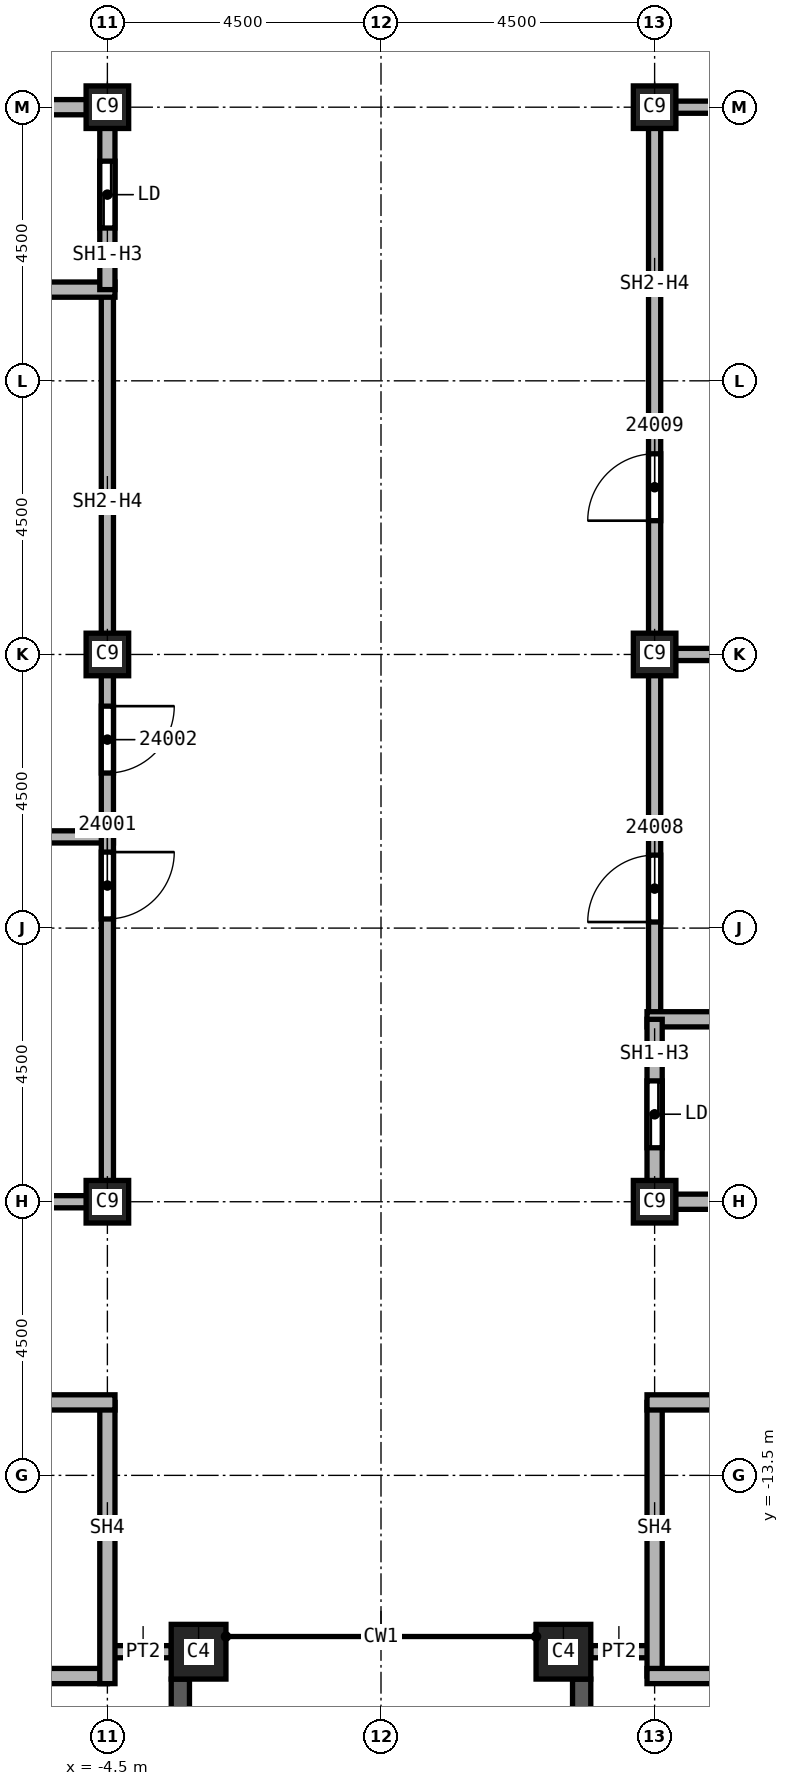
"""IFC4 building model, lengths in metres.
Left out: names, types, materials, properties, quantities, classifications, styles, units other than length and angle.
Written with IfcOpenShell. Run it as: python <this file> out.ifc"""

import sys

from ifc_helpers import new_model, si_unit, direction, frame, frame_2d, origin, origin_2d, place, context, subcontext, project, spatial, rectangle, extrude, element, fill, save


model = new_model("IFC4")
c1 = context("Model", 3, precision=1e-05, world=origin(), true_north=direction((0.0, 1.0)))
c2 = subcontext(c1, "Body", "Model", "MODEL_VIEW")
j1 = project(units=[si_unit("LENGTHUNIT", "METRE"), si_unit("PLANEANGLEUNIT", "RADIAN")], contexts=[c1])
p1 = place(None, origin())
s1 = spatial("IfcSite", under=j1, at=p1, CompositionType="ELEMENT")
p2 = place(p1, origin())
s2 = spatial("IfcBuilding", under=s1, at=p2, CompositionType="ELEMENT")
p3 = place(p2, frame((0.0, 0.0, 342.0)))
s3 = spatial("IfcBuildingStorey", under=s2, at=p3, CompositionType="ELEMENT", Elevation=342.0)
for number, where, z_axis, x_axis in (
    (1, (4.5, 0.0, 0.0), (0.0, 0.0, 1.0), (1.0, 0.0, 0.0)),
    (2, (4.5, 9.0, 0.0), (0.0, 0.0, 1.0), (1.0, 0.0, 0.0)),
    (3, (4.5, -9.0, 0.0), (0.0, 0.0, 1.0), (1.0, 0.0, 0.0)),
    (4, (-4.5, 0.0, 0.0), (0.0, 0.0, 1.0), (1.0, 0.0, 0.0)),
    (5, (-4.5, 9.0, 0.0), (0.0, 0.0, 1.0), (1.0, 0.0, 0.0)),
    (6, (-4.5, -9.0, 0.0), (0.0, 0.0, 1.0), (1.0, 0.0, 0.0)),
):
    element("IfcColumn", number, at=place(p3, frame(where, z_axis=z_axis, x_axis=x_axis)), inside=s3, PredefinedType="COLUMN", context=c2, shape_type="SweptSolid", body=[
        extrude(rectangle(XDim=0.7, YDim=0.7, at=origin_2d()), origin(), (0.0, 0.0, 1.0), 3.74),
    ])
for number, where, z_axis, x_axis in (
    (7, (3.0, -16.4, 0.0), (0.0, 0.0, 1.0), (1.0, 0.0, 0.0)),
    (8, (-3.0, -16.4, 0.0), (0.0, 0.0, 1.0), (1.0, 0.0, 0.0)),
):
    element("IfcColumn", number, at=place(p3, frame(where, z_axis=z_axis, x_axis=x_axis)), inside=s3, PredefinedType="COLUMN", context=c2, shape_type="SweptSolid", body=[
        extrude(rectangle(XDim=0.9, YDim=0.9, at=origin_2d()), origin(), (0.0, 0.0, 1.0), 3.74),
    ])
p4 = place(p3, frame((-3.3, -24.95, 0.0), z_axis=(0.0, 0.0, 1.0), x_axis=(0.0, 1.0, 0.0)))
e9 = element("IfcWall", 9, at=p4, inside=s3, PredefinedType="SOLIDWALL", context=c2, shape_type="SweptSolid", body=[
    extrude(rectangle(XDim=8.1, YDim=0.3, at=frame_2d((4.05, 0.0))), origin(), (0.0, 0.0, 1.0), 3.14),
])
p5 = place(p4, frame((0.825, 0.0, 0.8)))
e10 = element("IfcOpeningElement", 10, at=p5, cuts=e9, PredefinedType="OPENING", context=c2, shape_type="SweptSolid", body=[
    extrude(rectangle(XDim=2.4, YDim=1.95, at=frame_2d((1.2, 0.975))), frame((0.0, 0.15, 0.0), z_axis=(0.0, -1.0, 0.0), x_axis=(1.0, 0.0, 0.0)), (0.0, 0.0, 1.0), 0.3),
])
p6 = place(p4, frame((4.875, 0.0, 0.8)))
e11 = element("IfcOpeningElement", 11, at=p6, cuts=e9, PredefinedType="OPENING", context=c2, shape_type="SweptSolid", body=[
    extrude(rectangle(XDim=2.4, YDim=1.95, at=frame_2d((1.2, 0.975))), frame((0.0, 0.15, 0.0), z_axis=(0.0, -1.0, 0.0), x_axis=(1.0, 0.0, 0.0)), (0.0, 0.0, 1.0), 0.3),
])
p7 = place(p3, frame((3.3, -16.85, 0.0), z_axis=(0.0, 0.0, 1.0), x_axis=(0.0, -1.0, 0.0)))
e12 = element("IfcWall", 12, at=p7, inside=s3, PredefinedType="SOLIDWALL", context=c2, shape_type="SweptSolid", body=[
    extrude(rectangle(XDim=8.1, YDim=0.3, at=frame_2d((4.05, 0.0))), origin(), (0.0, 0.0, 1.0), 3.14),
])
p8 = place(p7, frame((0.825, 0.0, 0.8)))
e13 = element("IfcOpeningElement", 13, at=p8, cuts=e12, PredefinedType="OPENING", context=c2, shape_type="SweptSolid", body=[
    extrude(rectangle(XDim=2.4, YDim=1.95, at=frame_2d((1.2, 0.975))), frame((0.0, 0.15, 0.0), z_axis=(0.0, -1.0, 0.0), x_axis=(1.0, 0.0, 0.0)), (0.0, 0.0, 1.0), 0.3),
])
p9 = place(p7, frame((4.875, 0.0, 0.8)))
e14 = element("IfcOpeningElement", 14, at=p9, cuts=e12, PredefinedType="OPENING", context=c2, shape_type="SweptSolid", body=[
    extrude(rectangle(XDim=2.4, YDim=1.95, at=frame_2d((1.2, 0.975))), frame((0.0, 0.15, 0.0), z_axis=(0.0, -1.0, 0.0), x_axis=(1.0, 0.0, 0.0)), (0.0, 0.0, 1.0), 0.3),
])
for number, where, z_axis, x_axis in (
    (15, (-3.45, -16.4, 0.0), (0.0, 0.0, 1.0), (-1.0, 0.0, 0.0)),
    (16, (4.5, -16.4, 0.0), (0.0, 0.0, 1.0), (-1.0, 0.0, 0.0)),
):
    element("IfcWall", number, at=place(p3, frame(where, z_axis=z_axis, x_axis=x_axis)), inside=s3, PredefinedType="PARTITIONING", context=c2, shape_type="SweptSolid", body=[
        extrude(rectangle(XDim=1.05, YDim=0.2, at=frame_2d((0.525, 0.0))), origin(), (0.0, 0.0, 1.0), 3.74),
    ])
p10 = place(p3, frame((-7.625, -3.0, 0.0), z_axis=(0.0, 0.0, 1.0), x_axis=(1.0, 0.0, 0.0)))
e17 = element("IfcWall", 17, at=p10, inside=s3, PredefinedType="SOLIDWALL", context=c2, shape_type="SweptSolid", body=[
    extrude(rectangle(XDim=3.225, YDim=0.2, at=frame_2d((1.613, 0.0))), origin(), (0.0, 0.0, 1.0), 3.74),
])
p11 = place(p3, frame((-4.5, -9.0, 0.0), z_axis=(0.0, 0.0, 1.0), x_axis=(-1.0, 0.0, 0.0)))
e18 = element("IfcWall", 18, at=p11, inside=s3, PredefinedType="SOLIDWALL", context=c2, shape_type="SweptSolid", body=[
    extrude(rectangle(XDim=3.0, YDim=0.2, at=frame_2d((1.5, 0.0))), origin(), (0.0, 0.0, 1.0), 3.062),
])
p12 = place(p3, frame((-4.5, 6.0, 0.0), z_axis=(0.0, 0.0, 1.0), x_axis=(0.0, -1.0, 0.0)))
e19 = element("IfcWall", 19, at=p12, inside=s3, PredefinedType="SOLIDWALL", context=c2, shape_type="SweptSolid", body=[
    extrude(rectangle(XDim=15.1, YDim=0.2, at=frame_2d((7.55, 0.0))), origin(), (0.0, 0.0, 1.0), 3.062),
])
p13 = place(p12, frame((9.25, 0.0, 0.0)))
e20 = element("IfcOpeningElement", 20, at=p13, cuts=e19, PredefinedType="OPENING", context=c2, shape_type="SweptSolid", body=[
    extrude(rectangle(XDim=1.1, YDim=2.1, at=frame_2d((0.55, 1.05))), frame((0.0, 0.1, 0.0), z_axis=(0.0, -1.0, 0.0), x_axis=(1.0, 0.0, 0.0)), (0.0, 0.0, 1.0), 0.2),
])
p14 = place(p12, frame((6.85, 0.0, 0.0)))
e21 = element("IfcOpeningElement", 21, at=p14, cuts=e19, PredefinedType="OPENING", context=c2, shape_type="SweptSolid", body=[
    extrude(rectangle(XDim=1.1, YDim=2.1, at=frame_2d((0.55, 1.05))), frame((0.0, 0.1, 0.0), z_axis=(0.0, -1.0, 0.0), x_axis=(1.0, 0.0, 0.0)), (0.0, 0.0, 1.0), 0.2),
])
p15 = place(p3, frame((4.4, 0.0, 0.0), z_axis=(0.0, 0.0, 1.0), x_axis=(1.0, 0.0, 0.0)))
e22 = element("IfcWall", 22, at=p15, inside=s3, PredefinedType="SOLIDWALL", context=c2, shape_type="SweptSolid", body=[
    extrude(rectangle(XDim=3.225, YDim=0.2, at=frame_2d((1.613, 0.0))), origin(), (0.0, 0.0, 1.0), 3.74),
])
p16 = place(p3, frame((4.5, -6.0, 0.0), z_axis=(0.0, 0.0, 1.0), x_axis=(0.0, 1.0, 0.0)))
e23 = element("IfcWall", 23, at=p16, inside=s3, PredefinedType="SOLIDWALL", context=c2, shape_type="SweptSolid", body=[
    extrude(rectangle(XDim=15.1, YDim=0.2, at=frame_2d((7.55, 0.0))), origin(), (0.0, 0.0, 1.0), 3.062),
])
p17 = place(p16, frame((1.6, 0.0, 0.0)))
e24 = element("IfcOpeningElement", 24, at=p17, cuts=e23, PredefinedType="OPENING", context=c2, shape_type="SweptSolid", body=[
    extrude(rectangle(XDim=1.1, YDim=2.1, at=frame_2d((0.55, 1.05))), frame((0.0, 0.1, 0.0), z_axis=(0.0, -1.0, 0.0), x_axis=(1.0, 0.0, 0.0)), (0.0, 0.0, 1.0), 0.2),
])
p18 = place(p16, frame((8.2, 0.0, 0.0)))
e25 = element("IfcOpeningElement", 25, at=p18, cuts=e23, PredefinedType="OPENING", context=c2, shape_type="SweptSolid", body=[
    extrude(rectangle(XDim=1.1, YDim=2.1, at=frame_2d((0.55, 1.05))), frame((0.0, 0.1, 0.0), z_axis=(0.0, -1.0, 0.0), x_axis=(1.0, 0.0, 0.0)), (0.0, 0.0, 1.0), 0.2),
])
p19 = place(p3, frame((4.5, 9.0, 0.0), z_axis=(0.0, 0.0, 1.0), x_axis=(1.0, 0.0, 0.0)))
e26 = element("IfcWall", 26, at=p19, inside=s3, PredefinedType="SOLIDWALL", context=c2, shape_type="SweptSolid", body=[
    extrude(rectangle(XDim=3.0, YDim=0.2, at=frame_2d((1.5, 0.0))), origin(), (0.0, 0.0, 1.0), 3.062),
])
p20 = place(p3, frame((-7.625, 6.0, 0.0), z_axis=(0.0, 0.0, 1.0), x_axis=(1.0, 0.0, 0.0)))
e27 = element("IfcWall", 27, at=p20, inside=s3, PredefinedType="SOLIDWALL", context=c2, shape_type="SweptSolid", body=[
    extrude(rectangle(XDim=3.25, YDim=0.25, at=frame_2d((1.625, 0.0))), origin(), (0.0, 0.0, 1.0), 3.74),
])
p21 = place(p3, frame((-7.5, 9.0, 0.0), z_axis=(0.0, 0.0, 1.0), x_axis=(1.0, 0.0, 0.0)))
e28 = element("IfcWall", 28, at=p21, inside=s3, PredefinedType="SOLIDWALL", context=c2, shape_type="SweptSolid", body=[
    extrude(rectangle(XDim=3.0, YDim=0.25, at=frame_2d((1.5, 0.0))), origin(), (0.0, 0.0, 1.0), 3.062),
])
p22 = place(p3, frame((-4.5, 9.125, 0.0), z_axis=(0.0, 0.0, 1.0), x_axis=(0.0, -1.0, 0.0)))
e29 = element("IfcWall", 29, at=p22, inside=s3, PredefinedType="SOLIDWALL", context=c2, shape_type="SweptSolid", body=[
    extrude(rectangle(XDim=3.125, YDim=0.25, at=frame_2d((1.562, 0.0))), origin(), (0.0, 0.0, 1.0), 3.062),
])
p23 = place(p22, frame((1.012, 0.0, 0.0)))
e30 = element("IfcOpeningElement", 30, at=p23, cuts=e29, PredefinedType="OPENING", context=c2, shape_type="SweptSolid", body=[
    extrude(rectangle(XDim=1.1, YDim=2.1, at=frame_2d((0.55, 1.05))), frame((0.0, 0.125, 0.0), z_axis=(0.0, -1.0, 0.0), x_axis=(1.0, 0.0, 0.0)), (0.0, 0.0, 1.0), 0.25),
])
p24 = place(p3, frame((4.375, -6.0, 0.0), z_axis=(0.0, 0.0, 1.0), x_axis=(1.0, 0.0, 0.0)))
e31 = element("IfcWall", 31, at=p24, inside=s3, PredefinedType="SOLIDWALL", context=c2, shape_type="SweptSolid", body=[
    extrude(rectangle(XDim=3.25, YDim=0.25, at=frame_2d((1.625, 0.0))), origin(), (0.0, 0.0, 1.0), 3.74),
])
p25 = place(p3, frame((4.5, -9.125, 0.0), z_axis=(0.0, 0.0, 1.0), x_axis=(0.0, 1.0, 0.0)))
e32 = element("IfcWall", 32, at=p25, inside=s3, PredefinedType="SOLIDWALL", context=c2, shape_type="SweptSolid", body=[
    extrude(rectangle(XDim=3.125, YDim=0.25, at=frame_2d((1.562, 0.0))), origin(), (0.0, 0.0, 1.0), 3.062),
])
p26 = place(p25, frame((1.012, 0.0, 0.0)))
e33 = element("IfcOpeningElement", 33, at=p26, cuts=e32, PredefinedType="OPENING", context=c2, shape_type="SweptSolid", body=[
    extrude(rectangle(XDim=1.1, YDim=2.1, at=frame_2d((0.55, 1.05))), frame((0.0, 0.125, 0.0), z_axis=(0.0, -1.0, 0.0), x_axis=(1.0, 0.0, 0.0)), (0.0, 0.0, 1.0), 0.25),
])
p27 = place(p3, frame((7.5, -9.0, 0.0), z_axis=(0.0, 0.0, 1.0), x_axis=(-1.0, 0.0, 0.0)))
e34 = element("IfcWall", 34, at=p27, inside=s3, PredefinedType="SOLIDWALL", context=c2, shape_type="SweptSolid", body=[
    extrude(rectangle(XDim=3.0, YDim=0.25, at=frame_2d((1.5, 0.0))), origin(), (0.0, 0.0, 1.0), 3.062),
])
p28 = place(p3, frame((-4.5, -16.8, 0.0), z_axis=(0.0, 0.0, 1.0), x_axis=(-1.0, 0.0, 0.0)))
e35 = element("IfcWall", 35, at=p28, inside=s3, PredefinedType="SOLIDWALL", context=c2, shape_type="SweptSolid", body=[
    extrude(rectangle(XDim=9.0, YDim=0.25, at=frame_2d((4.5, 0.0))), origin(), (0.0, 0.0, 1.0), 3.74),
])
p29 = place(p3, frame((-4.5, -12.3, 0.0), z_axis=(0.0, 0.0, 1.0), x_axis=(0.0, -1.0, 0.0)))
e36 = element("IfcWall", 36, at=p29, inside=s3, PredefinedType="SOLIDWALL", context=c2, shape_type="SweptSolid", body=[
    extrude(rectangle(XDim=4.625, YDim=0.25, at=frame_2d((2.312, 0.0))), origin(), (0.0, 0.0, 1.0), 3.74),
])
p30 = place(p3, frame((-4.375, -12.3, 0.0), z_axis=(0.0, 0.0, 1.0), x_axis=(-1.0, 0.0, 0.0)))
e37 = element("IfcWall", 37, at=p30, inside=s3, PredefinedType="SOLIDWALL", context=c2, shape_type="SweptSolid", body=[
    extrude(rectangle(XDim=9.125, YDim=0.25, at=frame_2d((4.562, 0.0))), origin(), (0.0, 0.0, 1.0), 3.74),
])
p31 = place(p30, frame((7.2, 0.0, 0.0)))
e38 = element("IfcOpeningElement", 38, at=p31, cuts=e37, PredefinedType="OPENING", context=c2, shape_type="SweptSolid", body=[
    extrude(rectangle(XDim=1.2, YDim=2.1, at=frame_2d((0.6, 1.05))), frame((0.0, 0.125, 0.0), z_axis=(0.0, -1.0, 0.0), x_axis=(1.0, 0.0, 0.0)), (0.0, 0.0, 1.0), 0.25),
])
p32 = place(p3, frame((4.5, -16.8, 0.0), z_axis=(0.0, 0.0, 1.0), x_axis=(0.0, 1.0, 0.0)))
e39 = element("IfcWall", 39, at=p32, inside=s3, PredefinedType="SOLIDWALL", context=c2, shape_type="SweptSolid", body=[
    extrude(rectangle(XDim=4.5, YDim=0.25, at=frame_2d((2.25, 0.0))), origin(), (0.0, 0.0, 1.0), 3.74),
])
p33 = place(p3, frame((13.5, -16.8, 0.0), z_axis=(0.0, 0.0, 1.0), x_axis=(-1.0, 0.0, 0.0)))
e40 = element("IfcWall", 40, at=p33, inside=s3, PredefinedType="SOLIDWALL", context=c2, shape_type="SweptSolid", body=[
    extrude(rectangle(XDim=9.125, YDim=0.25, at=frame_2d((4.562, 0.0))), origin(), (0.0, 0.0, 1.0), 3.74),
])
p34 = place(p3, frame((13.5, -12.3, 0.0), z_axis=(0.0, 0.0, 1.0), x_axis=(-1.0, 0.0, 0.0)))
e41 = element("IfcWall", 41, at=p34, inside=s3, PredefinedType="SOLIDWALL", context=c2, shape_type="SweptSolid", body=[
    extrude(rectangle(XDim=9.125, YDim=0.25, at=frame_2d((4.562, 0.0))), origin(), (0.0, 0.0, 1.0), 3.74),
])
p35 = place(p34, frame((0.6, 0.0, 0.0)))
e42 = element("IfcOpeningElement", 42, at=p35, cuts=e41, PredefinedType="OPENING", context=c2, shape_type="SweptSolid", body=[
    extrude(rectangle(XDim=1.2, YDim=2.1, at=frame_2d((0.6, 1.05))), frame((0.0, 0.125, 0.0), z_axis=(0.0, -1.0, 0.0), x_axis=(1.0, 0.0, 0.0)), (0.0, 0.0, 1.0), 0.25),
])
p36 = place(p13, origin())
e43 = element("IfcDoor", 43, at=p36, inside=s3, OperationType="SINGLE_SWING_RIGHT", PredefinedType="DOOR", context=c2, shape_type="SweptSolid", body=[
    extrude(rectangle(XDim=1.1, YDim=2.1, at=frame_2d((0.55, 1.05))), frame((0.0, 0.025, 0.0), z_axis=(0.0, -1.0, 0.0), x_axis=(1.0, 0.0, 0.0)), (0.0, 0.0, 1.0), 0.05),
])
fill(e20, e43)
p37 = place(p14, origin())
e44 = element("IfcDoor", 44, at=p37, inside=s3, OperationType="SINGLE_SWING_LEFT", PredefinedType="DOOR", context=c2, shape_type="SweptSolid", body=[
    extrude(rectangle(XDim=1.1, YDim=2.1, at=frame_2d((0.55, 1.05))), frame((0.0, 0.025, 0.0), z_axis=(0.0, -1.0, 0.0), x_axis=(1.0, 0.0, 0.0)), (0.0, 0.0, 1.0), 0.05),
])
fill(e21, e44)
p38 = place(p17, origin())
e45 = element("IfcDoor", 45, at=p38, inside=s3, OperationType="SINGLE_SWING_LEFT", PredefinedType="DOOR", context=c2, shape_type="SweptSolid", body=[
    extrude(rectangle(XDim=1.1, YDim=2.1, at=frame_2d((0.55, 1.05))), frame((0.0, 0.025, 0.0), z_axis=(0.0, -1.0, 0.0), x_axis=(1.0, 0.0, 0.0)), (0.0, 0.0, 1.0), 0.05),
])
fill(e24, e45)
p39 = place(p18, origin())
e46 = element("IfcDoor", 46, at=p39, inside=s3, OperationType="SINGLE_SWING_RIGHT", PredefinedType="DOOR", context=c2, shape_type="SweptSolid", body=[
    extrude(rectangle(XDim=1.1, YDim=2.1, at=frame_2d((0.55, 1.05))), frame((0.0, 0.025, 0.0), z_axis=(0.0, -1.0, 0.0), x_axis=(1.0, 0.0, 0.0)), (0.0, 0.0, 1.0), 0.05),
])
fill(e25, e46)
p40 = place(p23, origin())
e47 = element("IfcDoor", 47, at=p40, inside=s3, OperationType="SLIDING_TO_LEFT", PredefinedType="DOOR", context=c2, shape_type="SweptSolid", body=[
    extrude(rectangle(XDim=1.1, YDim=2.1, at=frame_2d((0.55, 1.05))), frame((0.0, 0.025, 0.0), z_axis=(0.0, -1.0, 0.0), x_axis=(1.0, 0.0, 0.0)), (0.0, 0.0, 1.0), 0.05),
])
fill(e30, e47)
p41 = place(p26, origin())
e48 = element("IfcDoor", 48, at=p41, inside=s3, OperationType="SLIDING_TO_LEFT", PredefinedType="DOOR", context=c2, shape_type="SweptSolid", body=[
    extrude(rectangle(XDim=1.1, YDim=2.1, at=frame_2d((0.55, 1.05))), frame((0.0, 0.025, 0.0), z_axis=(0.0, -1.0, 0.0), x_axis=(1.0, 0.0, 0.0)), (0.0, 0.0, 1.0), 0.05),
])
fill(e33, e48)
save(model, sys.argv[1])
